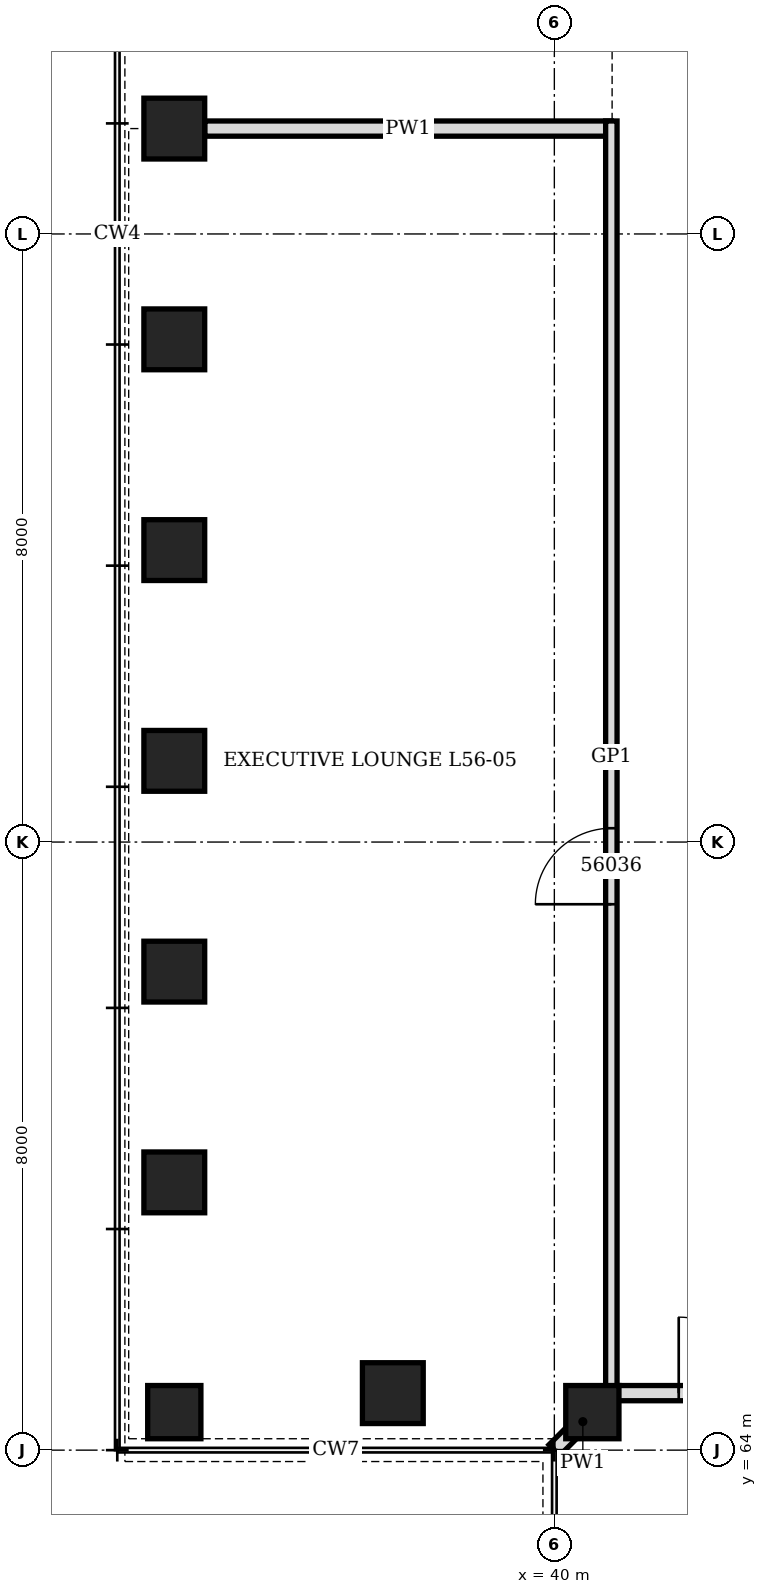
"""IFC4 building model, lengths in metres.
Left out: names, types, materials, properties, quantities, classifications, styles, units other than length and angle.
Written with IfcOpenShell. Run it as: python <this file> out.ifc"""

import sys

from ifc_helpers import new_model, si_unit, direction, frame, frame_2d, origin, origin_2d, place, context, subcontext, project, spatial, rectangle, hollow_rectangle, extrude, clip, halfspace, element, fill, save


model = new_model("IFC4")
c1 = context("Model", 3, precision=1e-05, world=origin(), true_north=direction((0.0, 1.0)))
c2 = subcontext(c1, "Body", "Model", "MODEL_VIEW")
j1 = project(units=[si_unit("LENGTHUNIT", "METRE"), si_unit("PLANEANGLEUNIT", "RADIAN")], contexts=[c1])
p1 = place(None, origin())
s1 = spatial("IfcSite", under=j1, at=p1, CompositionType="ELEMENT")
p2 = place(p1, origin())
s2 = spatial("IfcBuilding", under=s1, at=p2, CompositionType="ELEMENT")
p3 = place(p2, frame((0.0, 0.0, 250.3)))
s3 = spatial("IfcBuildingStorey", under=s2, at=p3, CompositionType="ELEMENT", Elevation=250.3)
for number, where, z_axis, x_axis in (
    (1, (35.0, 81.386, -0.16), (0.0, 0.0, 1.0), (0.0, 1.0, 0.0)),
    (2, (35.0, 78.614, -0.16), (0.0, 0.0, 1.0), (0.0, 1.0, 0.0)),
    (3, (35.0, 75.841, -0.16), (0.0, 0.0, 1.0), (0.0, 1.0, 0.0)),
    (4, (35.0, 73.068, -0.16), (0.0, 0.0, 1.0), (0.0, 1.0, 0.0)),
    (5, (35.0, 70.295, -0.16), (0.0, 0.0, 1.0), (0.0, 1.0, 0.0)),
    (6, (35.0, 67.523, -0.16), (0.0, 0.0, 1.0), (0.0, 1.0, 0.0)),
):
    element("IfcColumn", number, at=place(p3, frame(where, z_axis=z_axis, x_axis=x_axis)), inside=s3, PredefinedType="COLUMN", context=c2, shape_type="SweptSolid", body=[
        extrude(hollow_rectangle(XDim=0.8, YDim=0.8, WallThickness=0.1, at=origin_2d()), origin(), (0.0, 0.0, 1.0), 4.36),
    ])
p4 = place(p3, frame((35.0, 64.5, -0.16), z_axis=(0.0, 0.057244014902, 0.998360216935), x_axis=(-1.0, 0.0, 0.0)))
e7 = element("IfcColumn", 7, at=p4, inside=s3, PredefinedType="COLUMN", context=c2, shape_type="Clipping", body=[
    clip(clip(extrude(hollow_rectangle(XDim=0.7, YDim=0.7, WallThickness=0.08, at=origin_2d()), origin(), (0.0, 0.0, 1.0), 4.367), halfspace(frame((0.0, 0.0, 0.022), z_axis=(0.0, 0.0, 1.0), x_axis=(1.0, 0.0, 0.0)), True)), halfspace(frame((0.0, 0.0, 4.345), z_axis=(0.0, 0.0, -1.0), x_axis=(1.0, 0.0, 0.0)), True)),
])
p5 = place(p3, frame((37.875, 64.75, -0.16), z_axis=(0.0, 0.0, 1.0), x_axis=(1.0, 0.0, 0.0)))
e8 = element("IfcColumn", 8, at=p5, inside=s3, PredefinedType="COLUMN", context=c2, shape_type="SweptSolid", body=[
    extrude(hollow_rectangle(XDim=0.8, YDim=0.8, WallThickness=0.1, at=origin_2d()), origin(), (0.0, 0.0, 1.0), 4.36),
])
p6 = place(p3, frame((40.5, 64.5, -0.16), z_axis=(0.057150453976, 0.057150453976, 0.99672847417), x_axis=(-0.707106781187, 0.707106781187, 0.0)))
e9 = element("IfcColumn", 9, at=p6, inside=s3, PredefinedType="COLUMN", context=c2, shape_type="Clipping", body=[
    clip(clip(extrude(hollow_rectangle(XDim=0.7, YDim=0.7, WallThickness=0.08, at=origin_2d()), origin(), (0.0, 0.0, 1.0), 4.375), halfspace(frame((0.0, 0.0, 0.031), z_axis=(0.0, 0.0, 1.0), x_axis=(1.0, 0.0, 0.0)), True)), halfspace(frame((0.0, 0.0, 4.344), z_axis=(0.0, 0.0, -1.0), x_axis=(1.0, 0.0, 0.0)), True)),
])
p7 = place(p3, frame((35.4, 81.386, 0.0), z_axis=(0.0, 0.0, 1.0), x_axis=(1.0, 0.0, 0.0)))
e10 = element("IfcWall", 10, at=p7, inside=s3, PredefinedType="PARTITIONING", context=c2, shape_type="SweptSolid", body=[
    extrude(rectangle(XDim=5.35, YDim=0.2, at=frame_2d((2.675, 0.0))), origin(), (0.0, 0.0, 1.0), 3.428),
])
p8 = place(p3, frame((40.75, 64.75, 0.0), z_axis=(0.0, 0.0, 1.0), x_axis=(1.0, 0.0, 0.0)))
e11 = element("IfcWall", 11, at=p8, inside=s3, PredefinedType="PARTITIONING", context=c2, shape_type="SweptSolid", body=[
    extrude(rectangle(XDim=5.646, YDim=0.2, at=frame_2d((2.823, 0.0))), origin(), (0.0, 0.0, 1.0), 4.04),
])
p9 = place(p8, frame((0.886, 0.0, 0.0)))
e12 = element("IfcOpeningElement", 12, at=p9, cuts=e11, PredefinedType="OPENING", context=c2, shape_type="SweptSolid", body=[
    extrude(rectangle(XDim=1.0, YDim=2.1, at=frame_2d((0.5, 1.05))), frame((0.0, 0.11, 0.0), z_axis=(0.0, -1.0, 0.0), x_axis=(1.0, 0.0, 0.0)), (0.0, 0.0, 1.0), 0.22),
])
p10 = place(p3, frame((40.75, 64.75, 0.0), z_axis=(0.0, 0.0, 1.0), x_axis=(0.0, 1.0, 0.0)))
e13 = element("IfcWall", 13, at=p10, inside=s3, PredefinedType="PARTITIONING", context=c2, shape_type="SweptSolid", body=[
    extrude(rectangle(XDim=16.736, YDim=0.15, at=frame_2d((8.368, 0.0))), origin(), (0.0, 0.0, 1.0), 4.04),
])
p11 = place(p10, frame((6.432, 0.0, 0.0)))
e14 = element("IfcOpeningElement", 14, at=p11, cuts=e13, PredefinedType="OPENING", context=c2, shape_type="SweptSolid", body=[
    extrude(rectangle(XDim=1.0, YDim=2.4, at=frame_2d((0.5, 1.2))), frame((0.0, 0.085, 0.0), z_axis=(0.0, -1.0, 0.0), x_axis=(1.0, 0.0, 0.0)), (0.0, 0.0, 1.0), 0.17),
])
p12 = place(p3, frame((40.75, 64.75, 0.0), z_axis=(0.0, 0.0, 1.0), x_axis=(-0.707106781187, -0.707106781187, 0.0)))
e15 = element("IfcWall", 15, at=p12, inside=s3, PredefinedType="PARTITIONING", context=c2, shape_type="SweptSolid", body=[
    extrude(rectangle(XDim=1.061, YDim=0.2, at=frame_2d((0.53, 0.0))), origin(), (0.0, 0.0, 1.0), 4.04),
])
p13 = place(p9, origin())
e16 = element("IfcDoor", 16, at=p13, inside=s3, OperationType="SINGLE_SWING_LEFT", PredefinedType="DOOR", context=c2, shape_type="SweptSolid", body=[
    extrude(rectangle(XDim=1.0, YDim=2.1, at=frame_2d((0.5, 1.05))), frame((0.0, 0.1, 0.0), z_axis=(0.0, -1.0, 0.0), x_axis=(1.0, 0.0, 0.0)), (0.0, 0.0, 1.0), 0.199),
])
fill(e12, e16)
p14 = place(p11, origin())
e17 = element("IfcDoor", 17, at=p14, inside=s3, OperationType="SINGLE_SWING_RIGHT", PredefinedType="DOOR", context=c2, shape_type="SweptSolid", body=[
    extrude(rectangle(XDim=1.0, YDim=2.4, at=frame_2d((0.5, 1.2))), frame((0.0, 0.075, 0.0), z_axis=(0.0, -1.0, 0.0), x_axis=(1.0, 0.0, 0.0)), (0.0, 0.0, 1.0), 0.149),
])
fill(e14, e17)
save(model, sys.argv[1])
